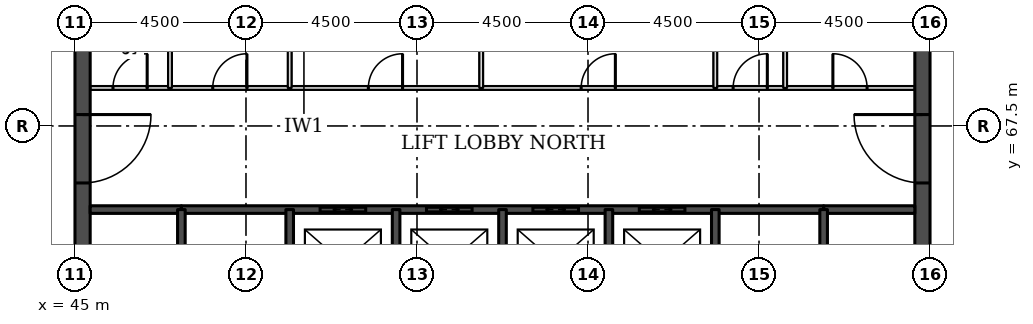
"""IFC4 building model, lengths in metres.
Left out: names, types, materials, properties, quantities, classifications, styles, units other than length and angle.
Written with IfcOpenShell. Run it as: python <this file> out.ifc"""

import sys

from ifc_helpers import new_model, si_unit, direction, frame, frame_2d, origin, place, context, subcontext, project, spatial, rectangle, extrude, element, fill, save


model = new_model("IFC4")
c1 = context("Model", 3, precision=1e-05, world=origin(), true_north=direction((0.0, 1.0)))
c2 = subcontext(c1, "Body", "Model", "MODEL_VIEW")
j1 = project(units=[si_unit("LENGTHUNIT", "METRE"), si_unit("PLANEANGLEUNIT", "RADIAN")], contexts=[c1])
p1 = place(None, origin())
s1 = spatial("IfcSite", under=j1, at=p1, CompositionType="ELEMENT")
p2 = place(p1, origin())
s2 = spatial("IfcBuilding", under=s1, at=p2, CompositionType="ELEMENT")
p3 = place(p2, frame((0.0, 0.0, 173.6)))
s3 = spatial("IfcBuildingStorey", under=s2, at=p3, CompositionType="ELEMENT", Elevation=173.6)
p4 = place(p3, frame((45.2, 49.5, 0.0), z_axis=(0.0, 0.0, 1.0), x_axis=(0.0, 1.0, 0.0)))
e1 = element("IfcWall", 1, at=p4, inside=s3, PredefinedType="SHEAR", context=c2, shape_type="SweptSolid", body=[
    extrude(rectangle(XDim=22.5, YDim=0.4, at=frame_2d((11.25, 0.0))), origin(), (0.0, 0.0, 1.0), 3.7),
])
p5 = place(p4, frame((4.2, 0.0, 0.0)))
e2 = element("IfcOpeningElement", 2, at=p5, cuts=e1, PredefinedType="OPENING", context=c2, shape_type="SweptSolid", body=[
    extrude(rectangle(XDim=1.8, YDim=2.1, at=frame_2d((0.9, 1.05))), frame((0.0, 0.21, 0.0), z_axis=(0.0, -1.0, 0.0), x_axis=(1.0, 0.0, 0.0)), (0.0, 0.0, 1.0), 0.42),
])
p6 = place(p4, frame((6.9, 0.0, 0.0)))
e3 = element("IfcOpeningElement", 3, at=p6, cuts=e1, PredefinedType="OPENING", context=c2, shape_type="SweptSolid", body=[
    extrude(rectangle(XDim=1.1, YDim=2.1, at=frame_2d((0.55, 1.05))), frame((0.0, 0.21, 0.0), z_axis=(0.0, -1.0, 0.0), x_axis=(1.0, 0.0, 0.0)), (0.0, 0.0, 1.0), 0.42),
])
p7 = place(p4, frame((13.6, 0.0, 0.0)))
e4 = element("IfcOpeningElement", 4, at=p7, cuts=e1, PredefinedType="OPENING", context=c2, shape_type="SweptSolid", body=[
    extrude(rectangle(XDim=1.1, YDim=2.1, at=frame_2d((0.55, 1.05))), frame((0.0, 0.21, 0.0), z_axis=(0.0, -1.0, 0.0), x_axis=(1.0, 0.0, 0.0)), (0.0, 0.0, 1.0), 0.42),
])
p8 = place(p4, frame((16.5, 0.0, 0.0)))
e5 = element("IfcOpeningElement", 5, at=p8, cuts=e1, PredefinedType="OPENING", context=c2, shape_type="SweptSolid", body=[
    extrude(rectangle(XDim=1.8, YDim=2.1, at=frame_2d((0.9, 1.05))), frame((0.0, 0.21, 0.0), z_axis=(0.0, -1.0, 0.0), x_axis=(1.0, 0.0, 0.0)), (0.0, 0.0, 1.0), 0.42),
])
p9 = place(p3, frame((67.3, 49.5, 0.0), z_axis=(0.0, 0.0, 1.0), x_axis=(0.0, 1.0, 0.0)))
e6 = element("IfcWall", 6, at=p9, inside=s3, PredefinedType="SHEAR", context=c2, shape_type="SweptSolid", body=[
    extrude(rectangle(XDim=22.5, YDim=0.4, at=frame_2d((11.25, 0.0))), origin(), (0.0, 0.0, 1.0), 3.7),
])
p10 = place(p9, frame((4.2, 0.0, 0.0)))
e7 = element("IfcOpeningElement", 7, at=p10, cuts=e6, PredefinedType="OPENING", context=c2, shape_type="SweptSolid", body=[
    extrude(rectangle(XDim=1.8, YDim=2.1, at=frame_2d((0.9, 1.05))), frame((0.0, 0.21, 0.0), z_axis=(0.0, -1.0, 0.0), x_axis=(1.0, 0.0, 0.0)), (0.0, 0.0, 1.0), 0.42),
])
p11 = place(p9, frame((6.9, 0.0, 0.0)))
e8 = element("IfcOpeningElement", 8, at=p11, cuts=e6, PredefinedType="OPENING", context=c2, shape_type="SweptSolid", body=[
    extrude(rectangle(XDim=1.1, YDim=2.1, at=frame_2d((0.55, 1.05))), frame((0.0, 0.21, 0.0), z_axis=(0.0, -1.0, 0.0), x_axis=(1.0, 0.0, 0.0)), (0.0, 0.0, 1.0), 0.42),
])
p12 = place(p9, frame((13.6, 0.0, 0.0)))
e9 = element("IfcOpeningElement", 9, at=p12, cuts=e6, PredefinedType="OPENING", context=c2, shape_type="SweptSolid", body=[
    extrude(rectangle(XDim=1.1, YDim=2.1, at=frame_2d((0.55, 1.05))), frame((0.0, 0.21, 0.0), z_axis=(0.0, -1.0, 0.0), x_axis=(1.0, 0.0, 0.0)), (0.0, 0.0, 1.0), 0.42),
])
p13 = place(p9, frame((16.5, 0.0, 0.0)))
e10 = element("IfcOpeningElement", 10, at=p13, cuts=e6, PredefinedType="OPENING", context=c2, shape_type="SweptSolid", body=[
    extrude(rectangle(XDim=1.8, YDim=2.1, at=frame_2d((0.9, 1.05))), frame((0.0, 0.21, 0.0), z_axis=(0.0, -1.0, 0.0), x_axis=(1.0, 0.0, 0.0)), (0.0, 0.0, 1.0), 0.42),
])
for number, where, z_axis, x_axis in (
    (11, (45.4, 65.3, 0.0), (0.0, 0.0, 1.0), (1.0, 0.0, 0.0)),
    (12, (64.7, 65.3, 0.0), (0.0, 0.0, 1.0), (1.0, 0.0, 0.0)),
):
    element("IfcWall", number, at=place(p3, frame(where, z_axis=z_axis, x_axis=x_axis)), inside=s3, PredefinedType="SOLIDWALL", context=c2, shape_type="SweptSolid", body=[
        extrude(rectangle(XDim=2.4, YDim=0.2, at=frame_2d((1.2, 0.0))), origin(), (0.0, 0.0, 1.0), 3.55),
    ])
p14 = place(p3, frame((47.8, 65.3, 0.0), z_axis=(0.0, 0.0, 1.0), x_axis=(1.0, 0.0, 0.0)))
e13 = element("IfcWall", 13, at=p14, inside=s3, PredefinedType="SOLIDWALL", context=c2, shape_type="SweptSolid", body=[
    extrude(rectangle(XDim=16.9, YDim=0.2, at=frame_2d((8.45, 0.0))), origin(), (0.0, 0.0, 1.0), 3.55),
])
p15 = place(p14, frame((3.65, 0.0, 0.0)))
e14 = element("IfcOpeningElement", 14, at=p15, cuts=e13, PredefinedType="OPENING", context=c2, shape_type="SweptSolid", body=[
    extrude(rectangle(XDim=1.2, YDim=2.1, at=frame_2d((0.6, 1.05))), frame((0.0, 0.11, 0.0), z_axis=(0.0, -1.0, 0.0), x_axis=(1.0, 0.0, 0.0)), (0.0, 0.0, 1.0), 0.22),
])
p16 = place(p14, frame((6.45, 0.0, 0.0)))
e15 = element("IfcOpeningElement", 15, at=p16, cuts=e13, PredefinedType="OPENING", context=c2, shape_type="SweptSolid", body=[
    extrude(rectangle(XDim=1.2, YDim=2.1, at=frame_2d((0.6, 1.05))), frame((0.0, 0.11, 0.0), z_axis=(0.0, -1.0, 0.0), x_axis=(1.0, 0.0, 0.0)), (0.0, 0.0, 1.0), 0.22),
])
p17 = place(p14, frame((9.25, 0.0, 0.0)))
e16 = element("IfcOpeningElement", 16, at=p17, cuts=e13, PredefinedType="OPENING", context=c2, shape_type="SweptSolid", body=[
    extrude(rectangle(XDim=1.2, YDim=2.1, at=frame_2d((0.6, 1.05))), frame((0.0, 0.11, 0.0), z_axis=(0.0, -1.0, 0.0), x_axis=(1.0, 0.0, 0.0)), (0.0, 0.0, 1.0), 0.22),
])
p18 = place(p14, frame((12.05, 0.0, 0.0)))
e17 = element("IfcOpeningElement", 17, at=p18, cuts=e13, PredefinedType="OPENING", context=c2, shape_type="SweptSolid", body=[
    extrude(rectangle(XDim=1.2, YDim=2.1, at=frame_2d((0.6, 1.05))), frame((0.0, 0.11, 0.0), z_axis=(0.0, -1.0, 0.0), x_axis=(1.0, 0.0, 0.0)), (0.0, 0.0, 1.0), 0.22),
])
p19 = place(p3, frame((45.4, 68.5, 0.0), z_axis=(0.0, 0.0, 1.0), x_axis=(1.0, 0.0, 0.0)))
e18 = element("IfcWall", 18, at=p19, inside=s3, PredefinedType="PARTITIONING", context=c2, shape_type="SweptSolid", body=[
    extrude(rectangle(XDim=21.7, YDim=0.1, at=frame_2d((10.85, 0.0))), origin(), (0.0, 0.0, 1.0), 3.55),
])
p20 = place(p19, frame((19.544, 0.0, 0.0)))
e19 = element("IfcOpeningElement", 19, at=p20, cuts=e18, PredefinedType="OPENING", context=c2, shape_type="SweptSolid", body=[
    extrude(rectangle(XDim=0.9, YDim=2.1, at=frame_2d((0.45, 1.05))), frame((0.0, 0.06, 0.0), z_axis=(0.0, -1.0, 0.0), x_axis=(1.0, 0.0, 0.0)), (0.0, 0.0, 1.0), 0.12),
])
p21 = place(p19, frame((16.919, 0.0, 0.0)))
e20 = element("IfcOpeningElement", 20, at=p21, cuts=e18, PredefinedType="OPENING", context=c2, shape_type="SweptSolid", body=[
    extrude(rectangle(XDim=0.9, YDim=2.1, at=frame_2d((0.45, 1.05))), frame((0.0, 0.06, 0.0), z_axis=(0.0, -1.0, 0.0), x_axis=(1.0, 0.0, 0.0)), (0.0, 0.0, 1.0), 0.12),
])
p22 = place(p19, frame((0.6, 0.0, 0.0)))
e21 = element("IfcOpeningElement", 21, at=p22, cuts=e18, PredefinedType="OPENING", context=c2, shape_type="SweptSolid", body=[
    extrude(rectangle(XDim=0.9, YDim=2.1, at=frame_2d((0.45, 1.05))), frame((0.0, 0.06, 0.0), z_axis=(0.0, -1.0, 0.0), x_axis=(1.0, 0.0, 0.0)), (0.0, 0.0, 1.0), 0.12),
])
p23 = place(p19, frame((3.225, 0.0, 0.0)))
e22 = element("IfcOpeningElement", 22, at=p23, cuts=e18, PredefinedType="OPENING", context=c2, shape_type="SweptSolid", body=[
    extrude(rectangle(XDim=0.9, YDim=2.1, at=frame_2d((0.45, 1.05))), frame((0.0, 0.06, 0.0), z_axis=(0.0, -1.0, 0.0), x_axis=(1.0, 0.0, 0.0)), (0.0, 0.0, 1.0), 0.12),
])
p24 = place(p19, frame((12.92, 0.0, 0.0)))
e23 = element("IfcOpeningElement", 23, at=p24, cuts=e18, PredefinedType="OPENING", context=c2, shape_type="SweptSolid", body=[
    extrude(rectangle(XDim=0.9, YDim=2.1, at=frame_2d((0.45, 1.05))), frame((0.0, 0.06, 0.0), z_axis=(0.0, -1.0, 0.0), x_axis=(1.0, 0.0, 0.0)), (0.0, 0.0, 1.0), 0.12),
])
p25 = place(p19, frame((7.32, 0.0, 0.0)))
e24 = element("IfcOpeningElement", 24, at=p25, cuts=e18, PredefinedType="OPENING", context=c2, shape_type="SweptSolid", body=[
    extrude(rectangle(XDim=0.9, YDim=2.1, at=frame_2d((0.45, 1.05))), frame((0.0, 0.06, 0.0), z_axis=(0.0, -1.0, 0.0), x_axis=(1.0, 0.0, 0.0)), (0.0, 0.0, 1.0), 0.12),
])
p26 = place(p3, frame((47.5, 68.5, 0.0), z_axis=(0.0, 0.0, 1.0), x_axis=(0.0, 1.0, 0.0)))
e25 = element("IfcWall", 25, at=p26, inside=s3, PredefinedType="PARTITIONING", context=c2, shape_type="SweptSolid", body=[
    extrude(rectangle(XDim=3.1, YDim=0.1, at=frame_2d((1.55, 0.0))), origin(), (0.0, 0.0, 1.0), 3.55),
])
p27 = place(p3, frame((47.8, 62.0, 0.0), z_axis=(0.0, 0.0, 1.0), x_axis=(0.0, 1.0, 0.0)))
e26 = element("IfcWall", 26, at=p27, inside=s3, PredefinedType="SOLIDWALL", context=c2, shape_type="SweptSolid", body=[
    extrude(rectangle(XDim=3.3, YDim=0.2, at=frame_2d((1.65, 0.0))), origin(), (0.0, 0.0, 1.0), 3.55),
])
p28 = place(p27, frame((1.1, 0.0, 0.0)))
e27 = element("IfcOpeningElement", 27, at=p28, cuts=e26, PredefinedType="OPENING", context=c2, shape_type="SweptSolid", body=[
    extrude(rectangle(XDim=1.1, YDim=2.1, at=frame_2d((0.55, 1.05))), frame((0.0, 0.11, 0.0), z_axis=(0.0, -1.0, 0.0), x_axis=(1.0, 0.0, 0.0)), (0.0, 0.0, 1.0), 0.22),
])
p29 = place(p3, frame((50.65, 68.5, 0.0), z_axis=(0.0, 0.0, 1.0), x_axis=(0.0, 1.0, 0.0)))
e28 = element("IfcWall", 28, at=p29, inside=s3, PredefinedType="PARTITIONING", context=c2, shape_type="SweptSolid", body=[
    extrude(rectangle(XDim=3.1, YDim=0.1, at=frame_2d((1.55, 0.0))), origin(), (0.0, 0.0, 1.0), 3.55),
])
p30 = place(p3, frame((50.65, 62.0, 0.0), z_axis=(0.0, 0.0, 1.0), x_axis=(0.0, 1.0, 0.0)))
e29 = element("IfcWall", 29, at=p30, inside=s3, PredefinedType="SOLIDWALL", context=c2, shape_type="SweptSolid", body=[
    extrude(rectangle(XDim=3.3, YDim=0.2, at=frame_2d((1.65, 0.0))), origin(), (0.0, 0.0, 1.0), 3.55),
])
p31 = place(p3, frame((53.45, 62.5, 0.0), z_axis=(0.0, 0.0, 1.0), x_axis=(0.0, 1.0, 0.0)))
e30 = element("IfcWall", 30, at=p31, inside=s3, PredefinedType="SOLIDWALL", context=c2, shape_type="SweptSolid", body=[
    extrude(rectangle(XDim=2.8, YDim=0.2, at=frame_2d((1.4, 0.0))), origin(), (0.0, 0.0, 1.0), 3.55),
])
p32 = place(p3, frame((55.69, 68.5, 0.0), z_axis=(0.0, 0.0, 1.0), x_axis=(0.0, 1.0, 0.0)))
e31 = element("IfcWall", 31, at=p32, inside=s3, PredefinedType="PARTITIONING", context=c2, shape_type="SweptSolid", body=[
    extrude(rectangle(XDim=3.1, YDim=0.1, at=frame_2d((1.55, 0.0))), origin(), (0.0, 0.0, 1.0), 3.55),
])
for number, where, z_axis, x_axis in (
    (32, (56.25, 62.5, 0.0), (0.0, 0.0, 1.0), (0.0, 1.0, 0.0)),
    (33, (59.05, 62.5, 0.0), (0.0, 0.0, 1.0), (0.0, 1.0, 0.0)),
):
    element("IfcWall", number, at=place(p3, frame(where, z_axis=z_axis, x_axis=x_axis)), inside=s3, PredefinedType="SOLIDWALL", context=c2, shape_type="SweptSolid", body=[
        extrude(rectangle(XDim=2.8, YDim=0.2, at=frame_2d((1.4, 0.0))), origin(), (0.0, 0.0, 1.0), 3.55),
    ])
p33 = place(p3, frame((61.85, 68.5, 0.0), z_axis=(0.0, 0.0, 1.0), x_axis=(0.0, 1.0, 0.0)))
e34 = element("IfcWall", 34, at=p33, inside=s3, PredefinedType="PARTITIONING", context=c2, shape_type="SweptSolid", body=[
    extrude(rectangle(XDim=3.1, YDim=0.1, at=frame_2d((1.55, 0.0))), origin(), (0.0, 0.0, 1.0), 3.55),
])
p34 = place(p3, frame((61.85, 62.0, 0.0), z_axis=(0.0, 0.0, 1.0), x_axis=(0.0, 1.0, 0.0)))
e35 = element("IfcWall", 35, at=p34, inside=s3, PredefinedType="SOLIDWALL", context=c2, shape_type="SweptSolid", body=[
    extrude(rectangle(XDim=3.3, YDim=0.2, at=frame_2d((1.65, 0.0))), origin(), (0.0, 0.0, 1.0), 3.55),
])
p35 = place(p3, frame((63.688, 68.5, 0.0), z_axis=(0.0, 0.0, 1.0), x_axis=(0.0, 1.0, 0.0)))
e36 = element("IfcWall", 36, at=p35, inside=s3, PredefinedType="PARTITIONING", context=c2, shape_type="SweptSolid", body=[
    extrude(rectangle(XDim=3.1, YDim=0.1, at=frame_2d((1.55, 0.0))), origin(), (0.0, 0.0, 1.0), 3.55),
])
p36 = place(p3, frame((64.7, 62.0, 0.0), z_axis=(0.0, 0.0, 1.0), x_axis=(0.0, 1.0, 0.0)))
e37 = element("IfcWall", 37, at=p36, inside=s3, PredefinedType="SOLIDWALL", context=c2, shape_type="SweptSolid", body=[
    extrude(rectangle(XDim=3.3, YDim=0.2, at=frame_2d((1.65, 0.0))), origin(), (0.0, 0.0, 1.0), 3.55),
])
p37 = place(p36, frame((1.1, 0.0, 0.0)))
e38 = element("IfcOpeningElement", 38, at=p37, cuts=e37, PredefinedType="OPENING", context=c2, shape_type="SweptSolid", body=[
    extrude(rectangle(XDim=1.1, YDim=2.1, at=frame_2d((0.55, 1.05))), frame((0.0, 0.11, 0.0), z_axis=(0.0, -1.0, 0.0), x_axis=(1.0, 0.0, 0.0)), (0.0, 0.0, 1.0), 0.22),
])
p38 = place(p15, origin())
e39 = element("IfcDoor", 39, at=p38, inside=s3, OperationType="DOUBLE_DOOR_SLIDING", PredefinedType="DOOR", context=c2, shape_type="SweptSolid", body=[
    extrude(rectangle(XDim=1.2, YDim=2.1, at=frame_2d((0.6, 1.05))), frame((0.0, 0.025, 0.0), z_axis=(0.0, -1.0, 0.0), x_axis=(1.0, 0.0, 0.0)), (0.0, 0.0, 1.0), 0.05),
])
fill(e14, e39)
p39 = place(p16, origin())
e40 = element("IfcDoor", 40, at=p39, inside=s3, OperationType="DOUBLE_DOOR_SLIDING", PredefinedType="DOOR", context=c2, shape_type="SweptSolid", body=[
    extrude(rectangle(XDim=1.2, YDim=2.1, at=frame_2d((0.6, 1.05))), frame((0.0, 0.025, 0.0), z_axis=(0.0, -1.0, 0.0), x_axis=(1.0, 0.0, 0.0)), (0.0, 0.0, 1.0), 0.05),
])
fill(e15, e40)
p40 = place(p17, origin())
e41 = element("IfcDoor", 41, at=p40, inside=s3, OperationType="DOUBLE_DOOR_SLIDING", PredefinedType="DOOR", context=c2, shape_type="SweptSolid", body=[
    extrude(rectangle(XDim=1.2, YDim=2.1, at=frame_2d((0.6, 1.05))), frame((0.0, 0.025, 0.0), z_axis=(0.0, -1.0, 0.0), x_axis=(1.0, 0.0, 0.0)), (0.0, 0.0, 1.0), 0.05),
])
fill(e16, e41)
p41 = place(p18, origin())
e42 = element("IfcDoor", 42, at=p41, inside=s3, OperationType="DOUBLE_DOOR_SLIDING", PredefinedType="DOOR", context=c2, shape_type="SweptSolid", body=[
    extrude(rectangle(XDim=1.2, YDim=2.1, at=frame_2d((0.6, 1.05))), frame((0.0, 0.025, 0.0), z_axis=(0.0, -1.0, 0.0), x_axis=(1.0, 0.0, 0.0)), (0.0, 0.0, 1.0), 0.05),
])
fill(e17, e42)
p42 = place(p8, frame((1.8, 0.0, 0.0), z_axis=(0.0, 0.0, 1.0), x_axis=(-1.0, 0.0, 0.0)))
e43 = element("IfcDoor", 43, at=p42, inside=s3, OperationType="SINGLE_SWING_LEFT", PredefinedType="DOOR", context=c2, shape_type="SweptSolid", body=[
    extrude(rectangle(XDim=1.8, YDim=2.1, at=frame_2d((0.9, 1.05))), frame((0.0, 0.025, 0.0), z_axis=(0.0, -1.0, 0.0), x_axis=(1.0, 0.0, 0.0)), (0.0, 0.0, 1.0), 0.05),
])
fill(e5, e43)
p43 = place(p13, origin())
e44 = element("IfcDoor", 44, at=p43, inside=s3, OperationType="SINGLE_SWING_RIGHT", PredefinedType="DOOR", context=c2, shape_type="SweptSolid", body=[
    extrude(rectangle(XDim=1.8, YDim=2.1, at=frame_2d((0.9, 1.05))), frame((0.0, 0.025, 0.0), z_axis=(0.0, -1.0, 0.0), x_axis=(1.0, 0.0, 0.0)), (0.0, 0.0, 1.0), 0.05),
])
fill(e10, e44)
p44 = place(p20, origin())
e45 = element("IfcDoor", 45, at=p44, inside=s3, OperationType="SINGLE_SWING_LEFT", PredefinedType="DOOR", context=c2, shape_type="SweptSolid", body=[
    extrude(rectangle(XDim=0.9, YDim=2.1, at=frame_2d((0.45, 1.05))), frame((0.0, 0.025, 0.0), z_axis=(0.0, -1.0, 0.0), x_axis=(1.0, 0.0, 0.0)), (0.0, 0.0, 1.0), 0.05),
])
fill(e19, e45)
p45 = place(p21, origin())
e46 = element("IfcDoor", 46, at=p45, inside=s3, OperationType="SINGLE_SWING_RIGHT", PredefinedType="DOOR", context=c2, shape_type="SweptSolid", body=[
    extrude(rectangle(XDim=0.9, YDim=2.1, at=frame_2d((0.45, 1.05))), frame((0.0, 0.025, 0.0), z_axis=(0.0, -1.0, 0.0), x_axis=(1.0, 0.0, 0.0)), (0.0, 0.0, 1.0), 0.05),
])
fill(e20, e46)
p46 = place(p22, origin())
e47 = element("IfcDoor", 47, at=p46, inside=s3, OperationType="SINGLE_SWING_RIGHT", PredefinedType="DOOR", context=c2, shape_type="SweptSolid", body=[
    extrude(rectangle(XDim=0.9, YDim=2.1, at=frame_2d((0.45, 1.05))), frame((0.0, 0.025, 0.0), z_axis=(0.0, -1.0, 0.0), x_axis=(1.0, 0.0, 0.0)), (0.0, 0.0, 1.0), 0.05),
])
fill(e21, e47)
p47 = place(p23, origin())
e48 = element("IfcDoor", 48, at=p47, inside=s3, OperationType="SINGLE_SWING_RIGHT", PredefinedType="DOOR", context=c2, shape_type="SweptSolid", body=[
    extrude(rectangle(XDim=0.9, YDim=2.1, at=frame_2d((0.45, 1.05))), frame((0.0, 0.025, 0.0), z_axis=(0.0, -1.0, 0.0), x_axis=(1.0, 0.0, 0.0)), (0.0, 0.0, 1.0), 0.05),
])
fill(e22, e48)
p48 = place(p24, origin())
e49 = element("IfcDoor", 49, at=p48, inside=s3, OperationType="SINGLE_SWING_RIGHT", PredefinedType="DOOR", context=c2, shape_type="SweptSolid", body=[
    extrude(rectangle(XDim=0.9, YDim=2.1, at=frame_2d((0.45, 1.05))), frame((0.0, 0.025, 0.0), z_axis=(0.0, -1.0, 0.0), x_axis=(1.0, 0.0, 0.0)), (0.0, 0.0, 1.0), 0.05),
])
fill(e23, e49)
p49 = place(p25, origin())
e50 = element("IfcDoor", 50, at=p49, inside=s3, OperationType="SINGLE_SWING_RIGHT", PredefinedType="DOOR", context=c2, shape_type="SweptSolid", body=[
    extrude(rectangle(XDim=0.9, YDim=2.1, at=frame_2d((0.45, 1.05))), frame((0.0, 0.025, 0.0), z_axis=(0.0, -1.0, 0.0), x_axis=(1.0, 0.0, 0.0)), (0.0, 0.0, 1.0), 0.05),
])
fill(e24, e50)
save(model, sys.argv[1])
